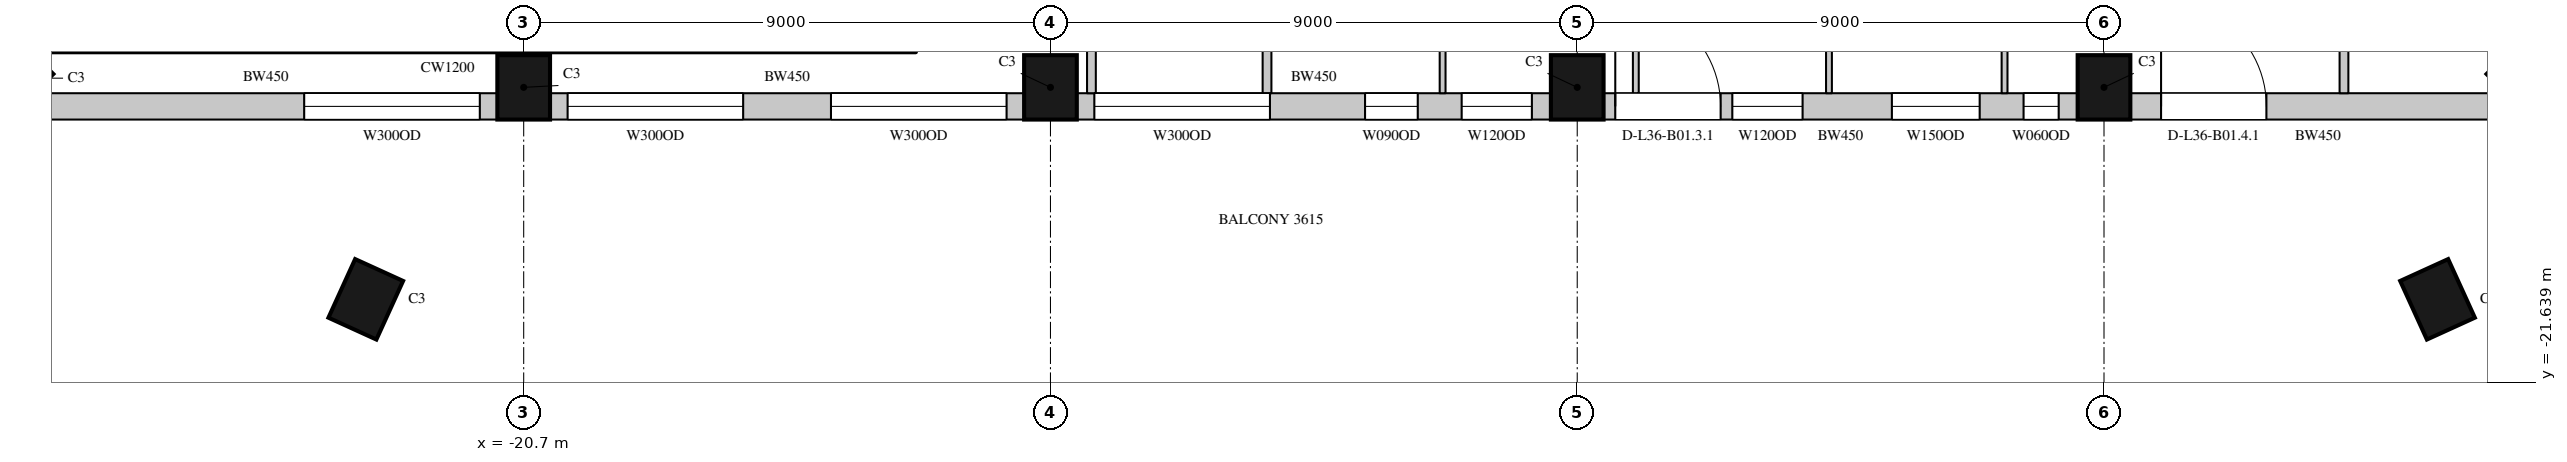
"""IFC4 building model, lengths in metres.
Left out: names, types, materials, properties, quantities, classifications, styles, units other than length and angle.
Written with IfcOpenShell. Run it as: python <this file> out.ifc"""

import sys

from ifc_helpers import new_model, si_unit, direction, frame, frame_2d, origin, origin_2d, place, context, subcontext, project, spatial, rectangle, extrude, element, fill, save


model = new_model("IFC4")
c1 = context("Model", 3, precision=1e-05, world=origin(), true_north=direction((0.0, 1.0)))
c2 = subcontext(c1, "Body", "Model", "MODEL_VIEW")
j1 = project(units=[si_unit("LENGTHUNIT", "METRE"), si_unit("PLANEANGLEUNIT", "RADIAN")], contexts=[c1])
p1 = place(None, origin())
s1 = spatial("IfcSite", under=j1, at=p1, CompositionType="ELEMENT")
p2 = place(p1, origin())
s2 = spatial("IfcBuilding", under=s1, at=p2, CompositionType="ELEMENT")
p3 = place(p2, frame((0.0, 0.0, 168.7)))
s3 = spatial("IfcBuildingStorey", under=s2, at=p3, CompositionType="ELEMENT", Elevation=168.7)
for number, where, z_axis, x_axis in (
    (1, (-29.443, -16.443, 0.0), (0.0, 0.0, 1.0), (0.707, -0.707, 0.0)),
    (2, (-20.7, -16.6, 0.0), (0.0, 0.0, 1.0), (1.0, 0.0, 0.0)),
    (3, (-11.7, -16.6, 0.0), (0.0, 0.0, 1.0), (1.0, 0.0, 0.0)),
    (4, (-2.7, -16.6, 0.0), (0.0, 0.0, 1.0), (1.0, 0.0, 0.0)),
    (5, (6.3, -16.6, 0.0), (0.0, 0.0, 1.0), (1.0, 0.0, 0.0)),
    (6, (13.543, -16.443, 0.0), (0.0, 0.0, 1.0), (0.707, 0.707, 0.0)),
    (7, (-23.398, -20.221, 0.0), (0.0, 0.0, 1.0), (0.91, -0.415, 0.0)),
    (8, (11.998, -20.221, 0.0), (0.0, 0.0, 1.0), (0.91, 0.415, 0.0)),
):
    element("IfcColumn", number, at=place(p3, frame(where, z_axis=z_axis, x_axis=x_axis)), inside=s3, PredefinedType="COLUMN", context=c2, shape_type="SweptSolid", body=[
        extrude(rectangle(XDim=0.9, YDim=1.1, at=origin_2d()), origin(), (0.0, 0.0, 1.0), 4.1),
    ])
p4 = place(p3, frame((-29.064, -16.925, 0.0), z_axis=(0.0, 0.0, 1.0), x_axis=(1.0, 0.0, 0.0)))
e9 = element("IfcWall", 9, at=p4, inside=s3, PredefinedType="SOLIDWALL", context=c2, shape_type="SweptSolid", body=[
    extrude(rectangle(XDim=7.914, YDim=0.45, at=frame_2d((3.957, 0.0))), origin(), (0.0, 0.0, 1.0), 3.8),
])
p5 = place(p4, frame((4.614, 0.0, 1.05)))
e10 = element("IfcOpeningElement", 10, at=p5, cuts=e9, PredefinedType="OPENING", context=c2, shape_type="SweptSolid", body=[
    extrude(rectangle(XDim=3.0, YDim=2.4, at=frame_2d((1.5, 1.2))), frame((0.0, 0.235, 0.0), z_axis=(0.0, -1.0, 0.0), x_axis=(1.0, 0.0, 0.0)), (0.0, 0.0, 1.0), 0.47),
])
p6 = place(p3, frame((-20.25, -16.925, 0.0), z_axis=(0.0, 0.0, 1.0), x_axis=(1.0, 0.0, 0.0)))
e11 = element("IfcWall", 11, at=p6, inside=s3, PredefinedType="SOLIDWALL", context=c2, shape_type="SweptSolid", body=[
    extrude(rectangle(XDim=8.1, YDim=0.45, at=frame_2d((4.05, 0.0))), origin(), (0.0, 0.0, 1.0), 3.8),
])
p7 = place(p6, frame((0.3, 0.0, 1.05)))
e12 = element("IfcOpeningElement", 12, at=p7, cuts=e11, PredefinedType="OPENING", context=c2, shape_type="SweptSolid", body=[
    extrude(rectangle(XDim=3.0, YDim=2.4, at=frame_2d((1.5, 1.2))), frame((0.0, 0.235, 0.0), z_axis=(0.0, -1.0, 0.0), x_axis=(1.0, 0.0, 0.0)), (0.0, 0.0, 1.0), 0.47),
])
p8 = place(p6, frame((4.8, 0.0, 1.05)))
e13 = element("IfcOpeningElement", 13, at=p8, cuts=e11, PredefinedType="OPENING", context=c2, shape_type="SweptSolid", body=[
    extrude(rectangle(XDim=3.0, YDim=2.4, at=frame_2d((1.5, 1.2))), frame((0.0, 0.235, 0.0), z_axis=(0.0, -1.0, 0.0), x_axis=(1.0, 0.0, 0.0)), (0.0, 0.0, 1.0), 0.47),
])
p9 = place(p3, frame((-11.25, -16.925, 0.0), z_axis=(0.0, 0.0, 1.0), x_axis=(1.0, 0.0, 0.0)))
e14 = element("IfcWall", 14, at=p9, inside=s3, PredefinedType="SOLIDWALL", context=c2, shape_type="SweptSolid", body=[
    extrude(rectangle(XDim=8.1, YDim=0.45, at=frame_2d((4.05, 0.0))), origin(), (0.0, 0.0, 1.0), 3.8),
])
p10 = place(p9, frame((0.3, 0.0, 1.05)))
e15 = element("IfcOpeningElement", 15, at=p10, cuts=e14, PredefinedType="OPENING", context=c2, shape_type="SweptSolid", body=[
    extrude(rectangle(XDim=3.0, YDim=2.4, at=frame_2d((1.5, 1.2))), frame((0.0, 0.235, 0.0), z_axis=(0.0, -1.0, 0.0), x_axis=(1.0, 0.0, 0.0)), (0.0, 0.0, 1.0), 0.47),
])
p11 = place(p9, frame((4.925, 0.0, 1.05)))
e16 = element("IfcOpeningElement", 16, at=p11, cuts=e14, PredefinedType="OPENING", context=c2, shape_type="SweptSolid", body=[
    extrude(rectangle(XDim=0.9, YDim=2.4, at=frame_2d((0.45, 1.2))), frame((0.0, 0.235, 0.0), z_axis=(0.0, -1.0, 0.0), x_axis=(1.0, 0.0, 0.0)), (0.0, 0.0, 1.0), 0.47),
])
p12 = place(p9, frame((6.575, 0.0, 1.05)))
e17 = element("IfcOpeningElement", 17, at=p12, cuts=e14, PredefinedType="OPENING", context=c2, shape_type="SweptSolid", body=[
    extrude(rectangle(XDim=1.2, YDim=2.4, at=frame_2d((0.6, 1.2))), frame((0.0, 0.235, 0.0), z_axis=(0.0, -1.0, 0.0), x_axis=(1.0, 0.0, 0.0)), (0.0, 0.0, 1.0), 0.47),
])
p13 = place(p3, frame((-2.25, -16.925, 0.0), z_axis=(0.0, 0.0, 1.0), x_axis=(1.0, 0.0, 0.0)))
e18 = element("IfcWall", 18, at=p13, inside=s3, PredefinedType="SOLIDWALL", context=c2, shape_type="SweptSolid", body=[
    extrude(rectangle(XDim=8.1, YDim=0.45, at=frame_2d((4.05, 0.0))), origin(), (0.0, 0.0, 1.0), 3.8),
])
p14 = place(p13, frame((0.2, 0.0, 0.0)))
e19 = element("IfcOpeningElement", 19, at=p14, cuts=e18, PredefinedType="OPENING", context=c2, shape_type="SweptSolid", body=[
    extrude(rectangle(XDim=1.8, YDim=2.4, at=frame_2d((0.9, 1.2))), frame((0.0, 0.235, 0.0), z_axis=(0.0, -1.0, 0.0), x_axis=(1.0, 0.0, 0.0)), (0.0, 0.0, 1.0), 0.47),
])
p15 = place(p13, frame((2.2, 0.0, 1.05)))
e20 = element("IfcOpeningElement", 20, at=p15, cuts=e18, PredefinedType="OPENING", context=c2, shape_type="SweptSolid", body=[
    extrude(rectangle(XDim=1.2, YDim=2.4, at=frame_2d((0.6, 1.2))), frame((0.0, 0.235, 0.0), z_axis=(0.0, -1.0, 0.0), x_axis=(1.0, 0.0, 0.0)), (0.0, 0.0, 1.0), 0.47),
])
p16 = place(p13, frame((4.926, 0.0, 1.05)))
e21 = element("IfcOpeningElement", 21, at=p16, cuts=e18, PredefinedType="OPENING", context=c2, shape_type="SweptSolid", body=[
    extrude(rectangle(XDim=1.5, YDim=2.4, at=frame_2d((0.75, 1.2))), frame((0.0, 0.235, 0.0), z_axis=(0.0, -1.0, 0.0), x_axis=(1.0, 0.0, 0.0)), (0.0, 0.0, 1.0), 0.47),
])
p17 = place(p13, frame((7.176, 0.0, 1.05)))
e22 = element("IfcOpeningElement", 22, at=p17, cuts=e18, PredefinedType="OPENING", context=c2, shape_type="SweptSolid", body=[
    extrude(rectangle(XDim=0.6, YDim=2.4, at=frame_2d((0.3, 1.2))), frame((0.0, 0.235, 0.0), z_axis=(0.0, -1.0, 0.0), x_axis=(1.0, 0.0, 0.0)), (0.0, 0.0, 1.0), 0.47),
])
p18 = place(p3, frame((6.75, -16.925, 0.0), z_axis=(0.0, 0.0, 1.0), x_axis=(1.0, 0.0, 0.0)))
e23 = element("IfcWall", 23, at=p18, inside=s3, PredefinedType="SOLIDWALL", context=c2, shape_type="SweptSolid", body=[
    extrude(rectangle(XDim=6.414, YDim=0.45, at=frame_2d((3.207, 0.0))), origin(), (0.0, 0.0, 1.0), 3.8),
])
p19 = place(p18, frame((0.525, 0.0, 0.0)))
e24 = element("IfcOpeningElement", 24, at=p19, cuts=e23, PredefinedType="OPENING", context=c2, shape_type="SweptSolid", body=[
    extrude(rectangle(XDim=1.8, YDim=2.4, at=frame_2d((0.9, 1.2))), frame((0.0, 0.235, 0.0), z_axis=(0.0, -1.0, 0.0), x_axis=(1.0, 0.0, 0.0)), (0.0, 0.0, 1.0), 0.47),
])
p20 = place(p3, frame((-26.95, -18.0, 0.0), z_axis=(0.0, 0.0, 1.0), x_axis=(1.0, 0.0, 0.0)))
e25 = element("IfcWall", 25, at=p20, inside=s3, PredefinedType="SOLIDWALL", context=c2, shape_type="SweptSolid", body=[
    extrude(rectangle(XDim=2.36, YDim=0.45, at=frame_2d((1.18, 0.0))), origin(), (0.0, 0.0, 1.0), 0.6),
])
for number, where, z_axis, x_axis in (
    (26, (-23.69, -18.0, 0.0), (0.0, 0.0, 1.0), (1.0, 0.0, 0.0)),
    (27, (-19.73, -18.0, 0.0), (0.0, 0.0, 1.0), (1.0, 0.0, 0.0)),
    (28, (-15.77, -18.0, 0.0), (0.0, 0.0, 1.0), (1.0, 0.0, 0.0)),
    (29, (-11.81, -18.0, 0.0), (0.0, 0.0, 1.0), (1.0, 0.0, 0.0)),
    (30, (-7.85, -18.0, 0.0), (0.0, 0.0, 1.0), (1.0, 0.0, 0.0)),
):
    element("IfcWall", number, at=place(p3, frame(where, z_axis=z_axis, x_axis=x_axis)), inside=s3, PredefinedType="SOLIDWALL", context=c2, shape_type="SweptSolid", body=[
        extrude(rectangle(XDim=3.76, YDim=0.45, at=frame_2d((1.88, 0.0))), origin(), (0.0, 0.0, 1.0), 0.6),
    ])
p21 = place(p3, frame((-3.89, -18.0, 0.0), z_axis=(0.0, 0.0, 1.0), x_axis=(1.0, 0.0, 0.0)))
e31 = element("IfcWall", 31, at=p21, inside=s3, PredefinedType="SOLIDWALL", context=c2, shape_type="SweptSolid", body=[
    extrude(rectangle(XDim=1.54, YDim=0.45, at=frame_2d((0.77, 0.0))), origin(), (0.0, 0.0, 1.0), 0.6),
])
p22 = place(p3, frame((0.07, -18.0, 0.0), z_axis=(0.0, 0.0, 1.0), x_axis=(1.0, 0.0, 0.0)))
e32 = element("IfcWall", 32, at=p22, inside=s3, PredefinedType="SOLIDWALL", context=c2, shape_type="SweptSolid", body=[
    extrude(rectangle(XDim=3.76, YDim=0.45, at=frame_2d((1.88, 0.0))), origin(), (0.0, 0.0, 1.0), 0.6),
])
p23 = place(p3, frame((4.03, -18.0, 0.0), z_axis=(0.0, 0.0, 1.0), x_axis=(1.0, 0.0, 0.0)))
e33 = element("IfcWall", 33, at=p23, inside=s3, PredefinedType="SOLIDWALL", context=c2, shape_type="SweptSolid", body=[
    extrude(rectangle(XDim=2.945, YDim=0.45, at=frame_2d((1.473, 0.0))), origin(), (0.0, 0.0, 1.0), 0.6),
])
p24 = place(p3, frame((-11.0, -16.7, 0.0), z_axis=(0.0, 0.0, 1.0), x_axis=(0.0, 1.0, 0.0)))
e34 = element("IfcWall", 34, at=p24, inside=s3, PredefinedType="PARTITIONING", context=c2, shape_type="SweptSolid", body=[
    extrude(rectangle(XDim=1.88, YDim=0.15, at=frame_2d((0.94, 0.0))), origin(), (0.0, 0.0, 1.0), 3.8),
])
p25 = place(p3, frame((-8.0, -16.7, 0.0), z_axis=(0.0, 0.0, 1.0), x_axis=(0.0, 1.0, 0.0)))
e35 = element("IfcWall", 35, at=p25, inside=s3, PredefinedType="PARTITIONING", context=c2, shape_type="SweptSolid", body=[
    extrude(rectangle(XDim=5.2, YDim=0.15, at=frame_2d((2.6, 0.0))), origin(), (0.0, 0.0, 1.0), 3.8),
])
p26 = place(p3, frame((10.4, -16.7, 0.0), z_axis=(0.0, 0.0, 1.0), x_axis=(0.0, 1.0, 0.0)))
e36 = element("IfcWall", 36, at=p26, inside=s3, PredefinedType="PARTITIONING", context=c2, shape_type="SweptSolid", body=[
    extrude(rectangle(XDim=5.3, YDim=0.15, at=frame_2d((2.65, 0.0))), origin(), (0.0, 0.0, 1.0), 3.8),
])
for number, where, z_axis, x_axis in (
    (37, (-5.0, -16.7, 0.0), (0.0, 0.0, 1.0), (0.0, 1.0, 0.0)),
    (38, (-1.699, -16.7, 0.0), (0.0, 0.0, 1.0), (0.0, 1.0, 0.0)),
):
    element("IfcWall", number, at=place(p3, frame(where, z_axis=z_axis, x_axis=x_axis)), inside=s3, PredefinedType="PARTITIONING", context=c2, shape_type="SweptSolid", body=[
        extrude(rectangle(XDim=5.2, YDim=0.1, at=frame_2d((2.6, 0.0))), origin(), (0.0, 0.0, 1.0), 3.8),
    ])
p27 = place(p3, frame((1.601, -16.7, 0.0), z_axis=(0.0, 0.0, 1.0), x_axis=(0.0, 1.0, 0.0)))
e39 = element("IfcWall", 39, at=p27, inside=s3, PredefinedType="PARTITIONING", context=c2, shape_type="SweptSolid", body=[
    extrude(rectangle(XDim=5.2, YDim=0.1, at=frame_2d((2.6, 0.0))), origin(), (0.0, 0.0, 1.0), 3.15),
])
p28 = place(p3, frame((4.601, -16.7, 0.0), z_axis=(0.0, 0.0, 1.0), x_axis=(0.0, 1.0, 0.0)))
e40 = element("IfcWall", 40, at=p28, inside=s3, PredefinedType="PARTITIONING", context=c2, shape_type="SweptSolid", body=[
    extrude(rectangle(XDim=5.2, YDim=0.1, at=frame_2d((2.6, 0.0))), origin(), (0.0, 0.0, 1.0), 3.8),
])
p29 = place(p5, origin())
e41 = element("IfcWindow", 41, at=p29, inside=s3, PartitioningType="SINGLE_PANEL", PredefinedType="WINDOW", context=c2, shape_type="SweptSolid", body=[
    extrude(rectangle(XDim=3.0, YDim=2.4, at=frame_2d((1.5, 1.2))), frame((0.0, 0.135, 0.0), z_axis=(0.0, -1.0, 0.0), x_axis=(1.0, 0.0, 0.0)), (0.0, 0.0, 1.0), 0.06),
])
fill(e10, e41)
p30 = place(p7, origin())
e42 = element("IfcWindow", 42, at=p30, inside=s3, PartitioningType="SINGLE_PANEL", PredefinedType="WINDOW", context=c2, shape_type="SweptSolid", body=[
    extrude(rectangle(XDim=3.0, YDim=2.4, at=frame_2d((1.5, 1.2))), frame((0.0, 0.135, 0.0), z_axis=(0.0, -1.0, 0.0), x_axis=(1.0, 0.0, 0.0)), (0.0, 0.0, 1.0), 0.06),
])
fill(e12, e42)
p31 = place(p8, origin())
e43 = element("IfcWindow", 43, at=p31, inside=s3, PartitioningType="SINGLE_PANEL", PredefinedType="WINDOW", context=c2, shape_type="SweptSolid", body=[
    extrude(rectangle(XDim=3.0, YDim=2.4, at=frame_2d((1.5, 1.2))), frame((0.0, 0.135, 0.0), z_axis=(0.0, -1.0, 0.0), x_axis=(1.0, 0.0, 0.0)), (0.0, 0.0, 1.0), 0.06),
])
fill(e13, e43)
p32 = place(p10, origin())
e44 = element("IfcWindow", 44, at=p32, inside=s3, PartitioningType="SINGLE_PANEL", PredefinedType="WINDOW", context=c2, shape_type="SweptSolid", body=[
    extrude(rectangle(XDim=3.0, YDim=2.4, at=frame_2d((1.5, 1.2))), frame((0.0, 0.135, 0.0), z_axis=(0.0, -1.0, 0.0), x_axis=(1.0, 0.0, 0.0)), (0.0, 0.0, 1.0), 0.06),
])
fill(e15, e44)
p33 = place(p14, origin())
e45 = element("IfcDoor", 45, at=p33, inside=s3, OperationType="SLIDING_TO_LEFT", PredefinedType="DOOR", context=c2, shape_type="SweptSolid", body=[
    extrude(rectangle(XDim=1.8, YDim=2.4, at=frame_2d((0.9, 1.2))), frame((0.0, 0.13, 0.0), z_axis=(0.0, -1.0, 0.0), x_axis=(1.0, 0.0, 0.0)), (0.0, 0.0, 1.0), 0.05),
])
fill(e19, e45)
p34 = place(p15, origin())
e46 = element("IfcWindow", 46, at=p34, inside=s3, PartitioningType="SINGLE_PANEL", PredefinedType="WINDOW", context=c2, shape_type="SweptSolid", body=[
    extrude(rectangle(XDim=1.2, YDim=2.4, at=frame_2d((0.6, 1.2))), frame((0.0, 0.135, 0.0), z_axis=(0.0, -1.0, 0.0), x_axis=(1.0, 0.0, 0.0)), (0.0, 0.0, 1.0), 0.06),
])
fill(e20, e46)
p35 = place(p19, origin())
e47 = element("IfcDoor", 47, at=p35, inside=s3, OperationType="SLIDING_TO_LEFT", PredefinedType="DOOR", context=c2, shape_type="SweptSolid", body=[
    extrude(rectangle(XDim=1.8, YDim=2.4, at=frame_2d((0.9, 1.2))), frame((0.0, 0.13, 0.0), z_axis=(0.0, -1.0, 0.0), x_axis=(1.0, 0.0, 0.0)), (0.0, 0.0, 1.0), 0.05),
])
fill(e24, e47)
p36 = place(p11, origin())
e48 = element("IfcWindow", 48, at=p36, inside=s3, PartitioningType="SINGLE_PANEL", PredefinedType="WINDOW", context=c2, shape_type="SweptSolid", body=[
    extrude(rectangle(XDim=0.9, YDim=2.4, at=frame_2d((0.45, 1.2))), frame((0.0, 0.135, 0.0), z_axis=(0.0, -1.0, 0.0), x_axis=(1.0, 0.0, 0.0)), (0.0, 0.0, 1.0), 0.06),
])
fill(e16, e48)
p37 = place(p12, origin())
e49 = element("IfcWindow", 49, at=p37, inside=s3, PartitioningType="SINGLE_PANEL", PredefinedType="WINDOW", context=c2, shape_type="SweptSolid", body=[
    extrude(rectangle(XDim=1.2, YDim=2.4, at=frame_2d((0.6, 1.2))), frame((0.0, 0.135, 0.0), z_axis=(0.0, -1.0, 0.0), x_axis=(1.0, 0.0, 0.0)), (0.0, 0.0, 1.0), 0.06),
])
fill(e17, e49)
p38 = place(p16, origin())
e50 = element("IfcWindow", 50, at=p38, inside=s3, PartitioningType="SINGLE_PANEL", PredefinedType="WINDOW", context=c2, shape_type="SweptSolid", body=[
    extrude(rectangle(XDim=1.5, YDim=2.4, at=frame_2d((0.75, 1.2))), frame((0.0, 0.135, 0.0), z_axis=(0.0, -1.0, 0.0), x_axis=(1.0, 0.0, 0.0)), (0.0, 0.0, 1.0), 0.06),
])
fill(e21, e50)
p39 = place(p17, origin())
e51 = element("IfcWindow", 51, at=p39, inside=s3, PartitioningType="SINGLE_PANEL", PredefinedType="WINDOW", context=c2, shape_type="SweptSolid", body=[
    extrude(rectangle(XDim=0.6, YDim=2.4, at=frame_2d((0.3, 1.2))), frame((0.0, 0.135, 0.0), z_axis=(0.0, -1.0, 0.0), x_axis=(1.0, 0.0, 0.0)), (0.0, 0.0, 1.0), 0.06),
])
fill(e22, e51)
save(model, sys.argv[1])
